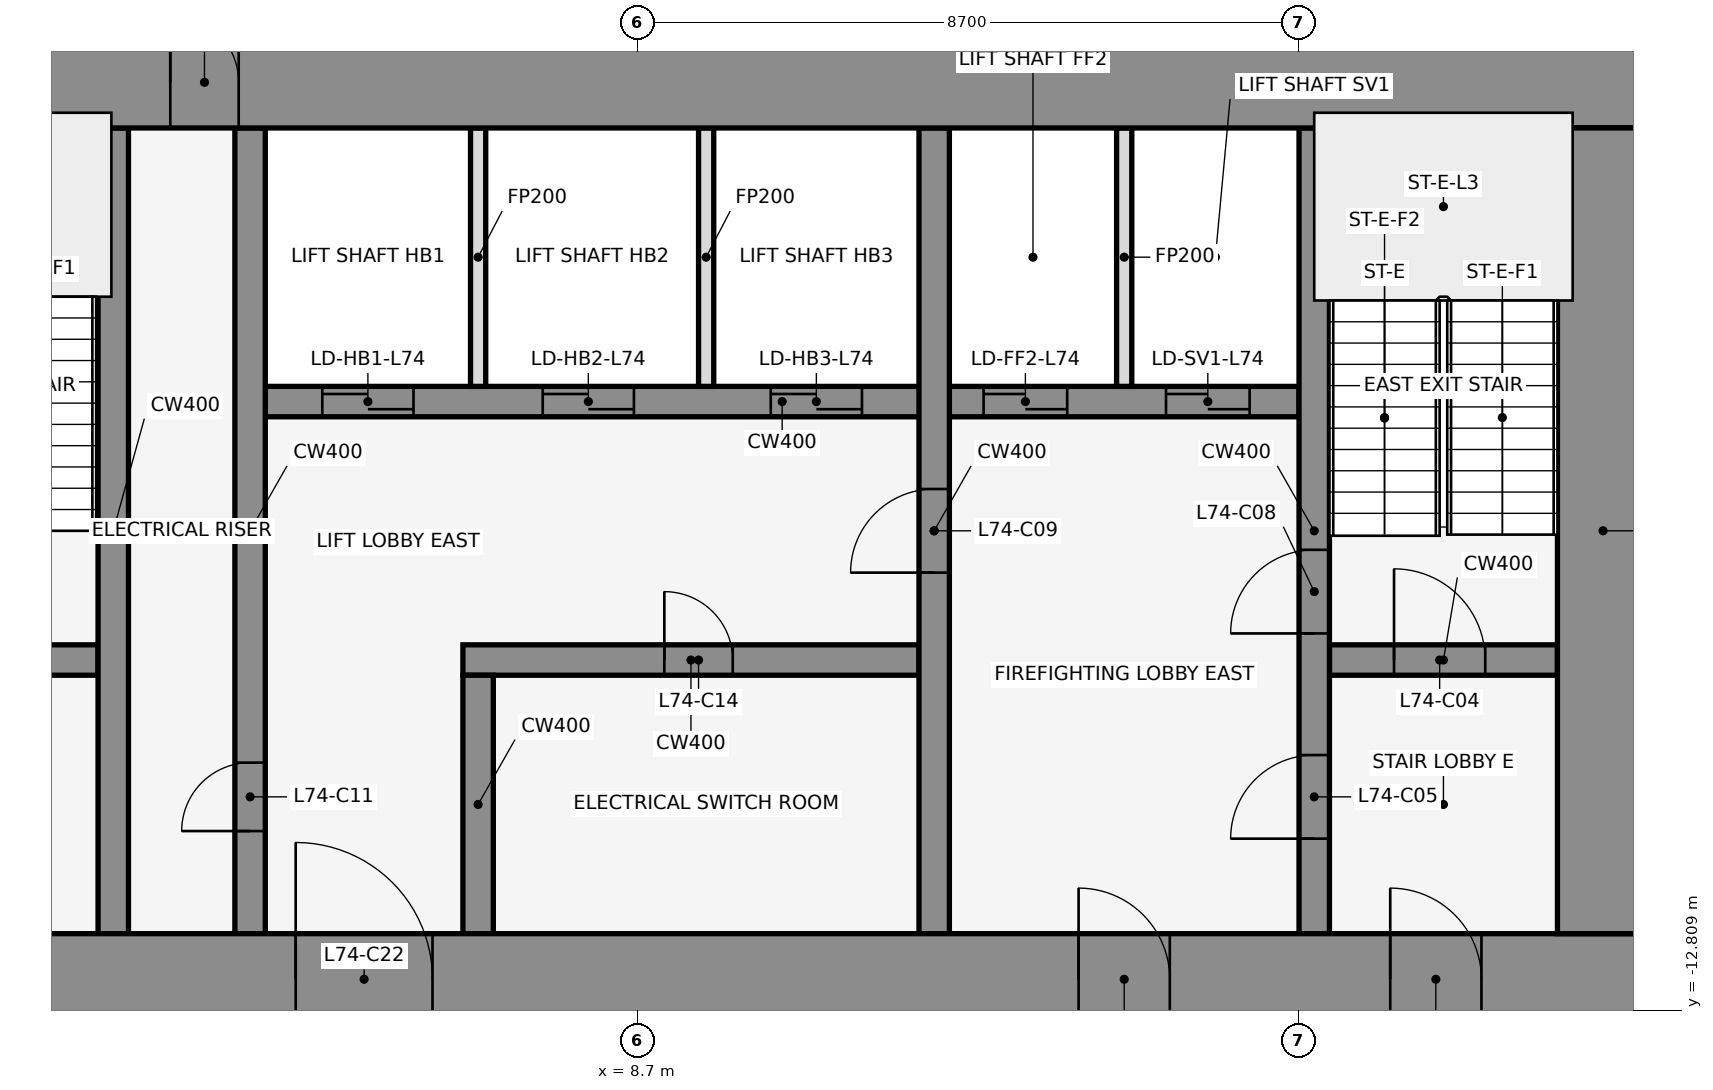
"""IFC4 building model, lengths in metres.
Left out: names, types, materials, properties, quantities, classifications, styles, units other than length and angle.
Written with IfcOpenShell. Run it as: python <this file> out.ifc"""

import sys

from ifc_helpers import new_model, si_unit, direction, frame, frame_2d, origin, place, context, subcontext, project, spatial, rectangle, extrude, element, fill, save


model = new_model("IFC4")
c1 = context("Model", 3, precision=1e-05, world=origin(), true_north=direction((0.0, 1.0)))
c2 = subcontext(c1, "Body", "Model", "MODEL_VIEW")
j1 = project(units=[si_unit("LENGTHUNIT", "METRE"), si_unit("PLANEANGLEUNIT", "RADIAN")], contexts=[c1])
p1 = place(None, origin())
s1 = spatial("IfcSite", under=j1, at=p1, CompositionType="ELEMENT")
p2 = place(p1, origin())
s2 = spatial("IfcBuilding", under=s1, at=p2, CompositionType="ELEMENT")
p3 = place(p2, frame((0.0, 0.0, 329.0)))
s3 = spatial("IfcBuildingStorey", under=s2, at=p3, CompositionType="ELEMENT", Elevation=329.0)
for number, where, z_axis, x_axis in (
    (1, (16.432, -0.105, 0.0), (0.0, 0.0, 1.0), (-0.84, 0.543, 0.0)),
    (2, (1.901, 1.08, 0.0), (0.0, 0.0, 1.0), (-0.84, -0.543, 0.0)),
):
    element("IfcWall", number, at=place(p3, frame(where, z_axis=z_axis, x_axis=x_axis)), inside=s3, PredefinedType="STANDARD", context=c2, shape_type="SweptSolid", body=[
        extrude(rectangle(XDim=2.183, YDim=0.25, at=frame_2d((1.091, 0.0))), origin(), (0.0, 0.0, 1.0), 4.35),
    ])
p4 = place(p3, frame((-1.6, -8.2, 0.0), z_axis=(0.0, 0.0, 1.0), x_axis=(1.0, 0.0, 0.0)))
e3 = element("IfcWall", 3, at=p4, inside=s3, PredefinedType="SHEAR", context=c2, shape_type="SweptSolid", body=[
    extrude(rectangle(XDim=3.2, YDim=0.4, at=frame_2d((1.6, 0.0))), origin(), (0.0, 0.0, 1.0), 4.5),
])
p5 = place(p4, frame((1.05, 0.0, 0.0)))
e4 = element("IfcOpeningElement", 4, at=p5, cuts=e3, PredefinedType="OPENING", context=c2, shape_type="SweptSolid", body=[
    extrude(rectangle(XDim=1.2, YDim=2.1, at=frame_2d((0.6, 1.05))), frame((0.0, 0.212, 0.0), z_axis=(0.0, -1.0, 0.0), x_axis=(1.0, 0.0, 0.0)), (0.0, 0.0, 1.0), 0.424),
])
p6 = place(p3, frame((6.4, -8.2, 0.0), z_axis=(0.0, 0.0, 1.0), x_axis=(1.0, 0.0, 0.0)))
e5 = element("IfcWall", 5, at=p6, inside=s3, PredefinedType="SHEAR", context=c2, shape_type="SweptSolid", body=[
    extrude(rectangle(XDim=6.0, YDim=0.4, at=frame_2d((3.0, 0.0))), origin(), (0.0, 0.0, 1.0), 4.5),
])
p7 = place(p6, frame((2.65, 0.0, 0.0)))
e6 = element("IfcOpeningElement", 6, at=p7, cuts=e5, PredefinedType="OPENING", context=c2, shape_type="SweptSolid", body=[
    extrude(rectangle(XDim=0.9, YDim=2.1, at=frame_2d((0.45, 1.05))), frame((0.0, 0.212, 0.0), z_axis=(0.0, -1.0, 0.0), x_axis=(1.0, 0.0, 0.0)), (0.0, 0.0, 1.0), 0.424),
])
p8 = place(p3, frame((17.8, -8.2, 0.0), z_axis=(0.0, 0.0, 1.0), x_axis=(1.0, 0.0, 0.0)))
e7 = element("IfcWall", 7, at=p8, inside=s3, PredefinedType="SHEAR", context=c2, shape_type="SweptSolid", body=[
    extrude(rectangle(XDim=3.0, YDim=0.4, at=frame_2d((1.5, 0.0))), origin(), (0.0, 0.0, 1.0), 4.5),
])
p9 = place(p8, frame((0.85, 0.0, 0.0)))
e8 = element("IfcOpeningElement", 8, at=p9, cuts=e7, PredefinedType="OPENING", context=c2, shape_type="SweptSolid", body=[
    extrude(rectangle(XDim=1.2, YDim=2.1, at=frame_2d((0.6, 1.05))), frame((0.0, 0.212, 0.0), z_axis=(0.0, -1.0, 0.0), x_axis=(1.0, 0.0, 0.0)), (0.0, 0.0, 1.0), 0.424),
])
p10 = place(p3, frame((3.8, -4.8, 0.0), z_axis=(0.0, 0.0, 1.0), x_axis=(1.0, 0.0, 0.0)))
e9 = element("IfcWall", 9, at=p10, inside=s3, PredefinedType="SHEAR", context=c2, shape_type="SweptSolid", body=[
    extrude(rectangle(XDim=13.6, YDim=0.4, at=frame_2d((6.8, 0.0))), origin(), (0.0, 0.0, 1.0), 4.5),
])
p11 = place(p10, frame((0.75, 0.0, 0.0)))
e10 = element("IfcOpeningElement", 10, at=p11, cuts=e9, PredefinedType="OPENING", context=c2, shape_type="SweptSolid", body=[
    extrude(rectangle(XDim=1.2, YDim=2.1, at=frame_2d((0.6, 1.05))), frame((0.0, 0.212, 0.0), z_axis=(0.0, -1.0, 0.0), x_axis=(1.0, 0.0, 0.0)), (0.0, 0.0, 1.0), 0.424),
])
p12 = place(p10, frame((3.65, 0.0, 0.0)))
e11 = element("IfcOpeningElement", 11, at=p12, cuts=e9, PredefinedType="OPENING", context=c2, shape_type="SweptSolid", body=[
    extrude(rectangle(XDim=1.2, YDim=2.1, at=frame_2d((0.6, 1.05))), frame((0.0, 0.212, 0.0), z_axis=(0.0, -1.0, 0.0), x_axis=(1.0, 0.0, 0.0)), (0.0, 0.0, 1.0), 0.424),
])
p13 = place(p10, frame((6.65, 0.0, 0.0)))
e12 = element("IfcOpeningElement", 12, at=p13, cuts=e9, PredefinedType="OPENING", context=c2, shape_type="SweptSolid", body=[
    extrude(rectangle(XDim=1.2, YDim=2.1, at=frame_2d((0.6, 1.05))), frame((0.0, 0.212, 0.0), z_axis=(0.0, -1.0, 0.0), x_axis=(1.0, 0.0, 0.0)), (0.0, 0.0, 1.0), 0.424),
])
p14 = place(p10, frame((9.45, 0.0, 0.0)))
e13 = element("IfcOpeningElement", 13, at=p14, cuts=e9, PredefinedType="OPENING", context=c2, shape_type="SweptSolid", body=[
    extrude(rectangle(XDim=1.1, YDim=2.1, at=frame_2d((0.55, 1.05))), frame((0.0, 0.212, 0.0), z_axis=(0.0, -1.0, 0.0), x_axis=(1.0, 0.0, 0.0)), (0.0, 0.0, 1.0), 0.424),
])
p15 = place(p10, frame((11.85, 0.0, 0.0)))
e14 = element("IfcOpeningElement", 14, at=p15, cuts=e9, PredefinedType="OPENING", context=c2, shape_type="SweptSolid", body=[
    extrude(rectangle(XDim=1.1, YDim=2.1, at=frame_2d((0.55, 1.05))), frame((0.0, 0.212, 0.0), z_axis=(0.0, -1.0, 0.0), x_axis=(1.0, 0.0, 0.0)), (0.0, 0.0, 1.0), 0.424),
])
p16 = place(p3, frame((1.8, -11.8, 0.0), z_axis=(0.0, 0.0, 1.0), x_axis=(0.0, 1.0, 0.0)))
e15 = element("IfcWall", 15, at=p16, inside=s3, PredefinedType="SHEAR", context=c2, shape_type="SweptSolid", body=[
    extrude(rectangle(XDim=10.6, YDim=0.4, at=frame_2d((5.3, 0.0))), origin(), (0.0, 0.0, 1.0), 4.5),
])
p17 = place(p3, frame((3.6, -11.8, 0.0), z_axis=(0.0, 0.0, 1.0), x_axis=(0.0, 1.0, 0.0)))
e16 = element("IfcWall", 16, at=p17, inside=s3, PredefinedType="SHEAR", context=c2, shape_type="SweptSolid", body=[
    extrude(rectangle(XDim=10.6, YDim=0.4, at=frame_2d((5.3, 0.0))), origin(), (0.0, 0.0, 1.0), 4.5),
])
p18 = place(p17, frame((1.35, 0.0, 0.0)))
e17 = element("IfcOpeningElement", 17, at=p18, cuts=e16, PredefinedType="OPENING", context=c2, shape_type="SweptSolid", body=[
    extrude(rectangle(XDim=0.9, YDim=2.1, at=frame_2d((0.45, 1.05))), frame((0.0, 0.212, 0.0), z_axis=(0.0, -1.0, 0.0), x_axis=(1.0, 0.0, 0.0)), (0.0, 0.0, 1.0), 0.424),
])
p19 = place(p3, frame((6.6, -11.8, 0.0), z_axis=(0.0, 0.0, 1.0), x_axis=(0.0, 1.0, 0.0)))
e18 = element("IfcWall", 18, at=p19, inside=s3, PredefinedType="SHEAR", context=c2, shape_type="SweptSolid", body=[
    extrude(rectangle(XDim=3.4, YDim=0.4, at=frame_2d((1.7, 0.0))), origin(), (0.0, 0.0, 1.0), 4.5),
])
for number, where, z_axis, x_axis in (
    (19, (6.6, -4.6, 0.0), (0.0, 0.0, 1.0), (0.0, 1.0, 0.0)),
    (20, (9.6, -4.6, 0.0), (0.0, 0.0, 1.0), (0.0, 1.0, 0.0)),
):
    element("IfcWall", number, at=place(p3, frame(where, z_axis=z_axis, x_axis=x_axis)), inside=s3, PredefinedType="PARTITIONING", context=c2, shape_type="SweptSolid", body=[
        extrude(rectangle(XDim=3.4, YDim=0.2, at=frame_2d((1.7, 0.0))), origin(), (0.0, 0.0, 1.0), 3.418),
    ])
p20 = place(p3, frame((12.6, -11.8, 0.0), z_axis=(0.0, 0.0, 1.0), x_axis=(0.0, 1.0, 0.0)))
e21 = element("IfcWall", 21, at=p20, inside=s3, PredefinedType="SHEAR", context=c2, shape_type="SweptSolid", body=[
    extrude(rectangle(XDim=10.6, YDim=0.4, at=frame_2d((5.3, 0.0))), origin(), (0.0, 0.0, 1.0), 4.5),
])
p21 = place(p20, frame((4.75, 0.0, 0.0)))
e22 = element("IfcOpeningElement", 22, at=p21, cuts=e21, PredefinedType="OPENING", context=c2, shape_type="SweptSolid", body=[
    extrude(rectangle(XDim=1.1, YDim=2.1, at=frame_2d((0.55, 1.05))), frame((0.0, 0.212, 0.0), z_axis=(0.0, -1.0, 0.0), x_axis=(1.0, 0.0, 0.0)), (0.0, 0.0, 1.0), 0.424),
])
p22 = place(p3, frame((15.1, -4.6, 0.0), z_axis=(0.0, 0.0, 1.0), x_axis=(0.0, 1.0, 0.0)))
e23 = element("IfcWall", 23, at=p22, inside=s3, PredefinedType="PARTITIONING", context=c2, shape_type="SweptSolid", body=[
    extrude(rectangle(XDim=3.4, YDim=0.2, at=frame_2d((1.7, 0.0))), origin(), (0.0, 0.0, 1.0), 3.418),
])
p23 = place(p3, frame((17.6, -11.8, 0.0), z_axis=(0.0, 0.0, 1.0), x_axis=(0.0, 1.0, 0.0)))
e24 = element("IfcWall", 24, at=p23, inside=s3, PredefinedType="SHEAR", context=c2, shape_type="SweptSolid", body=[
    extrude(rectangle(XDim=10.6, YDim=0.4, at=frame_2d((5.3, 0.0))), origin(), (0.0, 0.0, 1.0), 4.5),
])
p24 = place(p23, frame((1.25, 0.0, 0.0)))
e25 = element("IfcOpeningElement", 25, at=p24, cuts=e24, PredefinedType="OPENING", context=c2, shape_type="SweptSolid", body=[
    extrude(rectangle(XDim=1.1, YDim=2.1, at=frame_2d((0.55, 1.05))), frame((0.0, 0.212, 0.0), z_axis=(0.0, -1.0, 0.0), x_axis=(1.0, 0.0, 0.0)), (0.0, 0.0, 1.0), 0.424),
])
p25 = place(p23, frame((3.95, 0.0, 0.0)))
e26 = element("IfcOpeningElement", 26, at=p25, cuts=e24, PredefinedType="OPENING", context=c2, shape_type="SweptSolid", body=[
    extrude(rectangle(XDim=1.1, YDim=2.1, at=frame_2d((0.55, 1.05))), frame((0.0, 0.212, 0.0), z_axis=(0.0, -1.0, 0.0), x_axis=(1.0, 0.0, 0.0)), (0.0, 0.0, 1.0), 0.424),
])
p26 = place(p3, frame((-22.0, -0.6, 0.0), z_axis=(0.0, 0.0, 1.0), x_axis=(1.0, 0.0, 0.0)))
e27 = element("IfcWall", 27, at=p26, inside=s3, PredefinedType="SHEAR", context=c2, shape_type="SweptSolid", body=[
    extrude(rectangle(XDim=44.0, YDim=1.2, at=frame_2d((22.0, 0.0))), origin(), (0.0, 0.0, 1.0), 4.5),
])
p27 = place(p26, frame((18.55, 0.0, 0.0)))
e28 = element("IfcOpeningElement", 28, at=p27, cuts=e27, PredefinedType="OPENING", context=c2, shape_type="SweptSolid", body=[
    extrude(rectangle(XDim=0.9, YDim=2.1, at=frame_2d((0.45, 1.05))), frame((0.0, 0.612, 0.0), z_axis=(0.0, -1.0, 0.0), x_axis=(1.0, 0.0, 0.0)), (0.0, 0.0, 1.0), 1.224),
])
p28 = place(p26, frame((24.55, 0.0, 0.0)))
e29 = element("IfcOpeningElement", 29, at=p28, cuts=e27, PredefinedType="OPENING", context=c2, shape_type="SweptSolid", body=[
    extrude(rectangle(XDim=0.9, YDim=2.1, at=frame_2d((0.45, 1.05))), frame((0.0, 0.612, 0.0), z_axis=(0.0, -1.0, 0.0), x_axis=(1.0, 0.0, 0.0)), (0.0, 0.0, 1.0), 1.224),
])
p29 = place(p3, frame((-22.0, -12.4, 0.0), z_axis=(0.0, 0.0, 1.0), x_axis=(1.0, 0.0, 0.0)))
e30 = element("IfcWall", 30, at=p29, inside=s3, PredefinedType="SHEAR", context=c2, shape_type="SweptSolid", body=[
    extrude(rectangle(XDim=44.0, YDim=1.2, at=frame_2d((22.0, 0.0))), origin(), (0.0, 0.0, 1.0), 4.5),
])
p30 = place(p29, frame((2.2, 0.0, 0.0)))
e31 = element("IfcOpeningElement", 31, at=p30, cuts=e30, PredefinedType="OPENING", context=c2, shape_type="SweptSolid", body=[
    extrude(rectangle(XDim=1.2, YDim=2.1, at=frame_2d((0.6, 1.05))), frame((0.0, 0.612, 0.0), z_axis=(0.0, -1.0, 0.0), x_axis=(1.0, 0.0, 0.0)), (0.0, 0.0, 1.0), 1.224),
])
p31 = place(p29, frame((21.4, 0.0, 0.0)))
e32 = element("IfcOpeningElement", 32, at=p31, cuts=e30, PredefinedType="OPENING", context=c2, shape_type="SweptSolid", body=[
    extrude(rectangle(XDim=1.2, YDim=2.1, at=frame_2d((0.6, 1.05))), frame((0.0, 0.612, 0.0), z_axis=(0.0, -1.0, 0.0), x_axis=(1.0, 0.0, 0.0)), (0.0, 0.0, 1.0), 1.224),
])
p32 = place(p29, frame((40.6, 0.0, 0.0)))
e33 = element("IfcOpeningElement", 33, at=p32, cuts=e30, PredefinedType="OPENING", context=c2, shape_type="SweptSolid", body=[
    extrude(rectangle(XDim=1.2, YDim=2.1, at=frame_2d((0.6, 1.05))), frame((0.0, 0.612, 0.0), z_axis=(0.0, -1.0, 0.0), x_axis=(1.0, 0.0, 0.0)), (0.0, 0.0, 1.0), 1.224),
])
p33 = place(p29, frame((16.0, 0.0, 0.0)))
e34 = element("IfcOpeningElement", 34, at=p33, cuts=e30, PredefinedType="OPENING", context=c2, shape_type="SweptSolid", body=[
    extrude(rectangle(XDim=1.8, YDim=2.1, at=frame_2d((0.9, 1.05))), frame((0.0, 0.612, 0.0), z_axis=(0.0, -1.0, 0.0), x_axis=(1.0, 0.0, 0.0)), (0.0, 0.0, 1.0), 1.224),
])
p34 = place(p29, frame((6.3, 0.0, 0.0)))
e35 = element("IfcOpeningElement", 35, at=p34, cuts=e30, PredefinedType="OPENING", context=c2, shape_type="SweptSolid", body=[
    extrude(rectangle(XDim=1.2, YDim=2.1, at=frame_2d((0.6, 1.05))), frame((0.0, 0.612, 0.0), z_axis=(0.0, -1.0, 0.0), x_axis=(1.0, 0.0, 0.0)), (0.0, 0.0, 1.0), 1.224),
])
p35 = place(p29, frame((26.2, 0.0, 0.0)))
e36 = element("IfcOpeningElement", 36, at=p35, cuts=e30, PredefinedType="OPENING", context=c2, shape_type="SweptSolid", body=[
    extrude(rectangle(XDim=1.8, YDim=2.1, at=frame_2d((0.9, 1.05))), frame((0.0, 0.612, 0.0), z_axis=(0.0, -1.0, 0.0), x_axis=(1.0, 0.0, 0.0)), (0.0, 0.0, 1.0), 1.224),
])
p36 = place(p29, frame((36.5, 0.0, 0.0)))
e37 = element("IfcOpeningElement", 37, at=p36, cuts=e30, PredefinedType="OPENING", context=c2, shape_type="SweptSolid", body=[
    extrude(rectangle(XDim=1.2, YDim=2.1, at=frame_2d((0.6, 1.05))), frame((0.0, 0.612, 0.0), z_axis=(0.0, -1.0, 0.0), x_axis=(1.0, 0.0, 0.0)), (0.0, 0.0, 1.0), 1.224),
])
p37 = place(p3, frame((21.4, -11.8, 0.0), z_axis=(0.0, 0.0, 1.0), x_axis=(0.0, 1.0, 0.0)))
e38 = element("IfcWall", 38, at=p37, inside=s3, PredefinedType="SHEAR", context=c2, shape_type="SweptSolid", body=[
    extrude(rectangle(XDim=10.6, YDim=1.2, at=frame_2d((5.3, 0.0))), origin(), (0.0, 0.0, 1.0), 4.5),
])
p38 = place(p9, origin())
e39 = element("IfcDoor", 39, at=p38, inside=s3, OperationType="SINGLE_SWING_RIGHT", PredefinedType="DOOR", context=c2, shape_type="SweptSolid", body=[
    extrude(rectangle(XDim=1.2, YDim=2.1, at=frame_2d((0.6, 1.05))), frame((0.0, 0.025, 0.0), z_axis=(0.0, -1.0, 0.0), x_axis=(1.0, 0.0, 0.0)), (0.0, 0.0, 1.0), 0.05),
])
fill(e8, e39)
p39 = place(p24, origin())
e40 = element("IfcDoor", 40, at=p39, inside=s3, OperationType="SINGLE_SWING_LEFT", PredefinedType="DOOR", context=c2, shape_type="SweptSolid", body=[
    extrude(rectangle(XDim=1.1, YDim=2.1, at=frame_2d((0.55, 1.05))), frame((0.0, 0.025, 0.0), z_axis=(0.0, -1.0, 0.0), x_axis=(1.0, 0.0, 0.0)), (0.0, 0.0, 1.0), 0.05),
])
fill(e25, e40)
p40 = place(p11, origin())
e41 = element("IfcDoor", 41, at=p40, inside=s3, OperationType="DOUBLE_DOOR_SLIDING", PredefinedType="DOOR", context=c2, shape_type="SweptSolid", body=[
    extrude(rectangle(XDim=1.2, YDim=2.1, at=frame_2d((0.6, 1.05))), frame((0.0, 0.025, 0.0), z_axis=(0.0, -1.0, 0.0), x_axis=(1.0, 0.0, 0.0)), (0.0, 0.0, 1.0), 0.05),
])
fill(e10, e41)
p41 = place(p12, origin())
e42 = element("IfcDoor", 42, at=p41, inside=s3, OperationType="DOUBLE_DOOR_SLIDING", PredefinedType="DOOR", context=c2, shape_type="SweptSolid", body=[
    extrude(rectangle(XDim=1.2, YDim=2.1, at=frame_2d((0.6, 1.05))), frame((0.0, 0.025, 0.0), z_axis=(0.0, -1.0, 0.0), x_axis=(1.0, 0.0, 0.0)), (0.0, 0.0, 1.0), 0.05),
])
fill(e11, e42)
p42 = place(p13, origin())
e43 = element("IfcDoor", 43, at=p42, inside=s3, OperationType="DOUBLE_DOOR_SLIDING", PredefinedType="DOOR", context=c2, shape_type="SweptSolid", body=[
    extrude(rectangle(XDim=1.2, YDim=2.1, at=frame_2d((0.6, 1.05))), frame((0.0, 0.025, 0.0), z_axis=(0.0, -1.0, 0.0), x_axis=(1.0, 0.0, 0.0)), (0.0, 0.0, 1.0), 0.05),
])
fill(e12, e43)
p43 = place(p14, origin())
e44 = element("IfcDoor", 44, at=p43, inside=s3, OperationType="DOUBLE_DOOR_SLIDING", PredefinedType="DOOR", context=c2, shape_type="SweptSolid", body=[
    extrude(rectangle(XDim=1.1, YDim=2.1, at=frame_2d((0.55, 1.05))), frame((0.0, 0.025, 0.0), z_axis=(0.0, -1.0, 0.0), x_axis=(1.0, 0.0, 0.0)), (0.0, 0.0, 1.0), 0.05),
])
fill(e13, e44)
p44 = place(p15, origin())
e45 = element("IfcDoor", 45, at=p44, inside=s3, OperationType="DOUBLE_DOOR_SLIDING", PredefinedType="DOOR", context=c2, shape_type="SweptSolid", body=[
    extrude(rectangle(XDim=1.1, YDim=2.1, at=frame_2d((0.55, 1.05))), frame((0.0, 0.025, 0.0), z_axis=(0.0, -1.0, 0.0), x_axis=(1.0, 0.0, 0.0)), (0.0, 0.0, 1.0), 0.05),
])
fill(e14, e45)
p45 = place(p25, origin())
e46 = element("IfcDoor", 46, at=p45, inside=s3, OperationType="SINGLE_SWING_RIGHT", PredefinedType="DOOR", context=c2, shape_type="SweptSolid", body=[
    extrude(rectangle(XDim=1.1, YDim=2.1, at=frame_2d((0.55, 1.05))), frame((0.0, 0.025, 0.0), z_axis=(0.0, -1.0, 0.0), x_axis=(1.0, 0.0, 0.0)), (0.0, 0.0, 1.0), 0.05),
])
fill(e26, e46)
p46 = place(p21, frame((1.1, 0.0, 0.0), z_axis=(0.0, 0.0, 1.0), x_axis=(-1.0, 0.0, 0.0)))
e47 = element("IfcDoor", 47, at=p46, inside=s3, OperationType="SINGLE_SWING_RIGHT", PredefinedType="DOOR", context=c2, shape_type="SweptSolid", body=[
    extrude(rectangle(XDim=1.1, YDim=2.1, at=frame_2d((0.55, 1.05))), frame((0.0, 0.025, 0.0), z_axis=(0.0, -1.0, 0.0), x_axis=(1.0, 0.0, 0.0)), (0.0, 0.0, 1.0), 0.05),
])
fill(e22, e47)
p47 = place(p18, origin())
e48 = element("IfcDoor", 48, at=p47, inside=s3, OperationType="SINGLE_SWING_LEFT", PredefinedType="DOOR", context=c2, shape_type="SweptSolid", body=[
    extrude(rectangle(XDim=0.9, YDim=2.1, at=frame_2d((0.45, 1.05))), frame((0.0, 0.025, 0.0), z_axis=(0.0, -1.0, 0.0), x_axis=(1.0, 0.0, 0.0)), (0.0, 0.0, 1.0), 0.05),
])
fill(e17, e48)
p48 = place(p7, frame((0.9, 0.0, 0.0), z_axis=(0.0, 0.0, 1.0), x_axis=(-1.0, 0.0, 0.0)))
e49 = element("IfcDoor", 49, at=p48, inside=s3, OperationType="SINGLE_SWING_LEFT", PredefinedType="DOOR", context=c2, shape_type="SweptSolid", body=[
    extrude(rectangle(XDim=0.9, YDim=2.1, at=frame_2d((0.45, 1.05))), frame((0.0, 0.025, 0.0), z_axis=(0.0, -1.0, 0.0), x_axis=(1.0, 0.0, 0.0)), (0.0, 0.0, 1.0), 0.05),
])
fill(e6, e49)
p49 = place(p28, origin())
e50 = element("IfcDoor", 50, at=p49, inside=s3, OperationType="SINGLE_SWING_LEFT", PredefinedType="DOOR", context=c2, shape_type="SweptSolid", body=[
    extrude(rectangle(XDim=0.9, YDim=2.1, at=frame_2d((0.45, 1.05))), frame((0.0, 0.025, 0.0), z_axis=(0.0, -1.0, 0.0), x_axis=(1.0, 0.0, 0.0)), (0.0, 0.0, 1.0), 0.05),
])
fill(e29, e50)
p50 = place(p32, frame((1.2, 0.0, 0.0), z_axis=(0.0, 0.0, 1.0), x_axis=(-1.0, 0.0, 0.0)))
e51 = element("IfcDoor", 51, at=p50, inside=s3, OperationType="SINGLE_SWING_RIGHT", PredefinedType="DOOR", context=c2, shape_type="SweptSolid", body=[
    extrude(rectangle(XDim=1.2, YDim=2.1, at=frame_2d((0.6, 1.05))), frame((0.0, 0.025, 0.0), z_axis=(0.0, -1.0, 0.0), x_axis=(1.0, 0.0, 0.0)), (0.0, 0.0, 1.0), 0.05),
])
fill(e33, e51)
p51 = place(p35, origin())
e52 = element("IfcDoor", 52, at=p51, inside=s3, OperationType="SINGLE_SWING_LEFT", PredefinedType="DOOR", context=c2, shape_type="SweptSolid", body=[
    extrude(rectangle(XDim=1.8, YDim=2.1, at=frame_2d((0.9, 1.05))), frame((0.0, 0.025, 0.0), z_axis=(0.0, -1.0, 0.0), x_axis=(1.0, 0.0, 0.0)), (0.0, 0.0, 1.0), 0.05),
])
fill(e36, e52)
p52 = place(p36, frame((1.2, 0.0, 0.0), z_axis=(0.0, 0.0, 1.0), x_axis=(-1.0, 0.0, 0.0)))
e53 = element("IfcDoor", 53, at=p52, inside=s3, OperationType="SINGLE_SWING_RIGHT", PredefinedType="DOOR", context=c2, shape_type="SweptSolid", body=[
    extrude(rectangle(XDim=1.2, YDim=2.1, at=frame_2d((0.6, 1.05))), frame((0.0, 0.025, 0.0), z_axis=(0.0, -1.0, 0.0), x_axis=(1.0, 0.0, 0.0)), (0.0, 0.0, 1.0), 0.05),
])
fill(e37, e53)
save(model, sys.argv[1])
